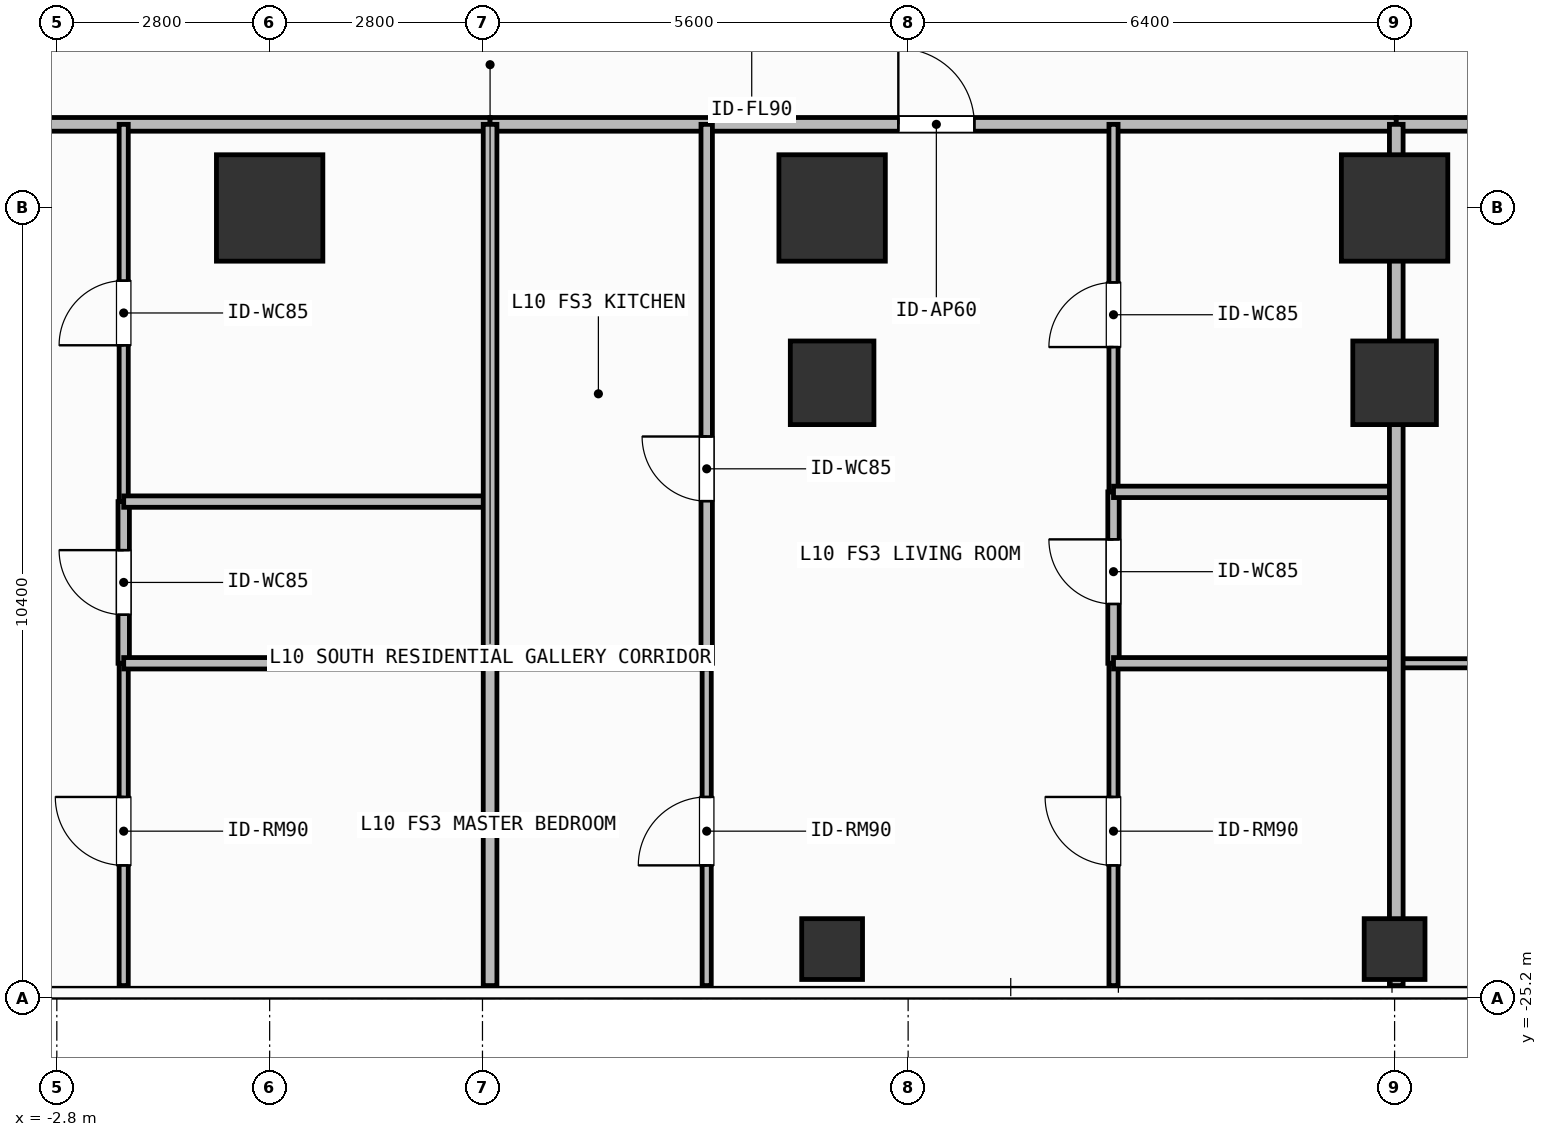
"""IFC4 building model, lengths in metres.
Left out: names, types, materials, properties, quantities, classifications, styles, units other than length and angle.
Written with IfcOpenShell. Run it as: python <this file> out.ifc"""

import sys

from ifc_helpers import new_model, si_unit, direction, frame, frame_2d, origin, origin_2d, place, context, subcontext, project, spatial, rectangle, hollow_rectangle, extrude, element, fill, save


model = new_model("IFC4")
c1 = context("Model", 3, precision=1e-05, world=origin(), true_north=direction((0.0, 1.0)))
c2 = subcontext(c1, "Body", "Model", "MODEL_VIEW")
j1 = project(units=[si_unit("LENGTHUNIT", "METRE"), si_unit("PLANEANGLEUNIT", "RADIAN")], contexts=[c1])
p1 = place(None, origin())
s1 = spatial("IfcSite", under=j1, at=p1, CompositionType="ELEMENT")
p2 = place(p1, origin())
s2 = spatial("IfcBuilding", under=s1, at=p2, CompositionType="ELEMENT")
p3 = place(p2, frame((0.0, 0.0, 38.4)))
s3 = spatial("IfcBuildingStorey", under=s2, at=p3, CompositionType="ELEMENT", Elevation=38.4)
for number, where, z_axis, x_axis in (
    (1, (0.0, -14.8, 0.0), (0.0, 0.0, 1.0), (1.0, 0.0, 0.0)),
    (2, (7.4, -14.8, 0.0), (0.0, 0.0, 1.0), (1.0, 0.0, 0.0)),
    (3, (14.8, -14.8, 0.0), (0.0, 0.0, 1.0), (1.0, 0.0, 0.0)),
):
    element("IfcColumn", number, at=place(p3, frame(where, z_axis=z_axis, x_axis=x_axis)), inside=s3, PredefinedType="COLUMN", context=c2, shape_type="SweptSolid", body=[
        extrude(rectangle(XDim=1.4, YDim=1.4, at=origin_2d()), origin(), (0.0, 0.0, 1.0), 3.9),
    ])
for number, where, z_axis, x_axis in (
    (4, (7.4, -17.1, 0.0), (0.0, 0.0, 1.0), (1.0, 0.0, 0.0)),
    (5, (14.8, -17.1, 0.0), (0.0, 0.0, 1.0), (1.0, 0.0, 0.0)),
):
    element("IfcColumn", number, at=place(p3, frame(where, z_axis=z_axis, x_axis=x_axis)), inside=s3, PredefinedType="COLUMN", context=c2, shape_type="SweptSolid", body=[
        extrude(rectangle(XDim=1.1, YDim=1.1, at=origin_2d()), origin(), (0.0, 0.0, 1.0), 3.9),
    ])
for number, where, z_axis, x_axis in (
    (6, (7.4, -24.55, 0.0), (0.0, 0.0, 1.0), (1.0, 0.0, 0.0)),
    (7, (14.8, -24.55, 0.0), (0.0, 0.0, 1.0), (1.0, 0.0, 0.0)),
):
    element("IfcColumn", number, at=place(p3, frame(where, z_axis=z_axis, x_axis=x_axis)), inside=s3, PredefinedType="COLUMN", context=c2, shape_type="SweptSolid", body=[
        extrude(hollow_rectangle(XDim=0.8, YDim=0.8, WallThickness=0.036, at=origin_2d()), origin(), (0.0, 0.0, 1.0), 3.9),
    ])
p4 = place(p3, frame((-9.151, -13.7, 0.0), z_axis=(0.0, 0.0, 1.0), x_axis=(1.0, 0.0, 0.0)))
e8 = element("IfcWall", 8, at=p4, inside=s3, PredefinedType="PARTITIONING", context=c2, shape_type="SweptSolid", body=[
    extrude(rectangle(XDim=12.051, YDim=0.18, at=frame_2d((6.025, 0.0))), origin(), (0.0, 0.0, 1.0), 3.68),
])
p5 = place(p4, frame((4.989, 0.0, 0.0)))
e9 = element("IfcOpeningElement", 9, at=p5, cuts=e8, PredefinedType="OPENING", context=c2, shape_type="SweptSolid", body=[
    extrude(rectangle(XDim=1.0, YDim=2.2, at=frame_2d((0.5, 1.1))), frame((0.0, 0.1, 0.0), z_axis=(0.0, -1.0, 0.0), x_axis=(1.0, 0.0, 0.0)), (0.0, 0.0, 1.0), 0.2),
])
p6 = place(p3, frame((-1.92, -20.79, 0.0), z_axis=(0.0, 0.0, 1.0), x_axis=(0.0, 1.0, 0.0)))
e10 = element("IfcWall", 10, at=p6, inside=s3, PredefinedType="PARTITIONING", context=c2, shape_type="SweptSolid", body=[
    extrude(rectangle(XDim=2.127, YDim=0.15, at=frame_2d((1.063, 0.0))), origin(), (0.0, 0.0, 1.0), 3.68),
])
p7 = place(p6, frame((0.638, 0.0, 0.0)))
e11 = element("IfcOpeningElement", 11, at=p7, cuts=e10, PredefinedType="OPENING", context=c2, shape_type="SweptSolid", body=[
    extrude(rectangle(XDim=0.85, YDim=2.1, at=frame_2d((0.425, 1.05))), frame((0.0, 0.085, 0.0), z_axis=(0.0, -1.0, 0.0), x_axis=(1.0, 0.0, 0.0)), (0.0, 0.0, 1.0), 0.17),
])
p8 = place(p3, frame((-1.92, -18.663, 0.0), z_axis=(0.0, 0.0, 1.0), x_axis=(0.0, 1.0, 0.0)))
e12 = element("IfcWall", 12, at=p8, inside=s3, PredefinedType="PARTITIONING", context=c2, shape_type="SweptSolid", body=[
    extrude(rectangle(XDim=4.963, YDim=0.12, at=frame_2d((2.481, 0.0))), origin(), (0.0, 0.0, 1.0), 3.68),
])
p9 = place(p8, frame((2.056, 0.0, 0.0)))
e13 = element("IfcOpeningElement", 13, at=p9, cuts=e12, PredefinedType="OPENING", context=c2, shape_type="SweptSolid", body=[
    extrude(rectangle(XDim=0.85, YDim=2.1, at=frame_2d((0.425, 1.05))), frame((0.0, 0.07, 0.0), z_axis=(0.0, -1.0, 0.0), x_axis=(1.0, 0.0, 0.0)), (0.0, 0.0, 1.0), 0.14),
])
p10 = place(p3, frame((-1.92, -25.03, 0.0), z_axis=(0.0, 0.0, 1.0), x_axis=(0.0, 1.0, 0.0)))
e14 = element("IfcWall", 14, at=p10, inside=s3, PredefinedType="PARTITIONING", context=c2, shape_type="SweptSolid", body=[
    extrude(rectangle(XDim=4.24, YDim=0.12, at=frame_2d((2.12, 0.0))), origin(), (0.0, 0.0, 1.0), 3.68),
])
p11 = place(p10, frame((1.581, 0.0, 0.0)))
e15 = element("IfcOpeningElement", 15, at=p11, cuts=e14, PredefinedType="OPENING", context=c2, shape_type="SweptSolid", body=[
    extrude(rectangle(XDim=0.9, YDim=2.1, at=frame_2d((0.45, 1.05))), frame((0.0, 0.07, 0.0), z_axis=(0.0, -1.0, 0.0), x_axis=(1.0, 0.0, 0.0)), (0.0, 0.0, 1.0), 0.14),
])
p12 = place(p3, frame((2.9, -13.7, 0.0), z_axis=(0.0, 0.0, 1.0), x_axis=(1.0, 0.0, 0.0)))
e16 = element("IfcWall", 16, at=p12, inside=s3, PredefinedType="PARTITIONING", context=c2, shape_type="SweptSolid", body=[
    extrude(rectangle(XDim=11.922, YDim=0.18, at=frame_2d((5.961, 0.0))), origin(), (0.0, 0.0, 1.0), 3.68),
])
p13 = place(p12, frame((5.371, 0.0, 0.0)))
e17 = element("IfcOpeningElement", 17, at=p13, cuts=e16, PredefinedType="OPENING", context=c2, shape_type="SweptSolid", body=[
    extrude(rectangle(XDim=1.0, YDim=2.2, at=frame_2d((0.5, 1.1))), frame((0.0, 0.1, 0.0), z_axis=(0.0, -1.0, 0.0), x_axis=(1.0, 0.0, 0.0)), (0.0, 0.0, 1.0), 0.2),
])
p14 = place(p3, frame((5.75, -20.79, 0.0), z_axis=(0.0, 0.0, 1.0), x_axis=(0.0, 1.0, 0.0)))
e18 = element("IfcWall", 18, at=p14, inside=s3, PredefinedType="PARTITIONING", context=c2, shape_type="SweptSolid", body=[
    extrude(rectangle(XDim=7.09, YDim=0.15, at=frame_2d((3.545, 0.0))), origin(), (0.0, 0.0, 1.0), 3.68),
])
p15 = place(p14, frame((2.133, 0.0, 0.0)))
e19 = element("IfcOpeningElement", 19, at=p15, cuts=e18, PredefinedType="OPENING", context=c2, shape_type="SweptSolid", body=[
    extrude(rectangle(XDim=0.85, YDim=2.1, at=frame_2d((0.425, 1.05))), frame((0.0, 0.085, 0.0), z_axis=(0.0, -1.0, 0.0), x_axis=(1.0, 0.0, 0.0)), (0.0, 0.0, 1.0), 0.17),
])
p16 = place(p3, frame((5.75, -25.03, 0.0), z_axis=(0.0, 0.0, 1.0), x_axis=(0.0, 1.0, 0.0)))
e20 = element("IfcWall", 20, at=p16, inside=s3, PredefinedType="PARTITIONING", context=c2, shape_type="SweptSolid", body=[
    extrude(rectangle(XDim=4.24, YDim=0.12, at=frame_2d((2.12, 0.0))), origin(), (0.0, 0.0, 1.0), 3.68),
])
p17 = place(p16, frame((1.581, 0.0, 0.0)))
e21 = element("IfcOpeningElement", 21, at=p17, cuts=e20, PredefinedType="OPENING", context=c2, shape_type="SweptSolid", body=[
    extrude(rectangle(XDim=0.9, YDim=2.1, at=frame_2d((0.45, 1.05))), frame((0.0, 0.07, 0.0), z_axis=(0.0, -1.0, 0.0), x_axis=(1.0, 0.0, 0.0)), (0.0, 0.0, 1.0), 0.14),
])
p18 = place(p3, frame((11.102, -20.79, 0.0), z_axis=(0.0, 0.0, 1.0), x_axis=(0.0, 1.0, 0.0)))
e22 = element("IfcWall", 22, at=p18, inside=s3, PredefinedType="PARTITIONING", context=c2, shape_type="SweptSolid", body=[
    extrude(rectangle(XDim=2.255, YDim=0.15, at=frame_2d((1.127, 0.0))), origin(), (0.0, 0.0, 1.0), 3.37),
])
p19 = place(p18, frame((0.78, 0.0, 0.0)))
e23 = element("IfcOpeningElement", 23, at=p19, cuts=e22, PredefinedType="OPENING", context=c2, shape_type="SweptSolid", body=[
    extrude(rectangle(XDim=0.85, YDim=2.1, at=frame_2d((0.425, 1.05))), frame((0.0, 0.085, 0.0), z_axis=(0.0, -1.0, 0.0), x_axis=(1.0, 0.0, 0.0)), (0.0, 0.0, 1.0), 0.17),
])
p20 = place(p3, frame((11.102, -18.535, 0.0), z_axis=(0.0, 0.0, 1.0), x_axis=(0.0, 1.0, 0.0)))
e24 = element("IfcWall", 24, at=p20, inside=s3, PredefinedType="PARTITIONING", context=c2, shape_type="SweptSolid", body=[
    extrude(rectangle(XDim=4.835, YDim=0.12, at=frame_2d((2.417, 0.0))), origin(), (0.0, 0.0, 1.0), 3.37),
])
p21 = place(p20, frame((1.905, 0.0, 0.0)))
e25 = element("IfcOpeningElement", 25, at=p21, cuts=e24, PredefinedType="OPENING", context=c2, shape_type="SweptSolid", body=[
    extrude(rectangle(XDim=0.85, YDim=2.1, at=frame_2d((0.425, 1.05))), frame((0.0, 0.07, 0.0), z_axis=(0.0, -1.0, 0.0), x_axis=(1.0, 0.0, 0.0)), (0.0, 0.0, 1.0), 0.14),
])
p22 = place(p3, frame((11.102, -25.03, 0.0), z_axis=(0.0, 0.0, 1.0), x_axis=(0.0, 1.0, 0.0)))
e26 = element("IfcWall", 26, at=p22, inside=s3, PredefinedType="PARTITIONING", context=c2, shape_type="SweptSolid", body=[
    extrude(rectangle(XDim=4.24, YDim=0.12, at=frame_2d((2.12, 0.0))), origin(), (0.0, 0.0, 1.0), 3.37),
])
p23 = place(p22, frame((1.581, 0.0, 0.0)))
e27 = element("IfcOpeningElement", 27, at=p23, cuts=e26, PredefinedType="OPENING", context=c2, shape_type="SweptSolid", body=[
    extrude(rectangle(XDim=0.9, YDim=2.1, at=frame_2d((0.45, 1.05))), frame((0.0, 0.07, 0.0), z_axis=(0.0, -1.0, 0.0), x_axis=(1.0, 0.0, 0.0)), (0.0, 0.0, 1.0), 0.14),
])
p24 = place(p3, frame((14.822, -13.7, 0.0), z_axis=(0.0, 0.0, 1.0), x_axis=(1.0, 0.0, 0.0)))
e28 = element("IfcWall", 28, at=p24, inside=s3, PredefinedType="PARTITIONING", context=c2, shape_type="SweptSolid", body=[
    extrude(rectangle(XDim=9.598, YDim=0.18, at=frame_2d((4.799, 0.0))), origin(), (0.0, 0.0, 1.0), 3.68),
])
p25 = place(p24, frame((2.859, 0.0, 0.0)))
e29 = element("IfcOpeningElement", 29, at=p25, cuts=e28, PredefinedType="OPENING", context=c2, shape_type="SweptSolid", body=[
    extrude(rectangle(XDim=1.0, YDim=2.2, at=frame_2d((0.5, 1.1))), frame((0.0, 0.1, 0.0), z_axis=(0.0, -1.0, 0.0), x_axis=(1.0, 0.0, 0.0)), (0.0, 0.0, 1.0), 0.2),
])
p26 = place(p3, frame((14.822, -20.79, 0.0), z_axis=(0.0, 0.0, 1.0), x_axis=(1.0, 0.0, 0.0)))
e30 = element("IfcWall", 30, at=p26, inside=s3, PredefinedType="PARTITIONING", context=c2, shape_type="SweptSolid", body=[
    extrude(rectangle(XDim=6.533, YDim=0.12, at=frame_2d((3.267, 0.0))), origin(), (0.0, 0.0, 1.0), 3.68),
])
p27 = place(p26, frame((2.816, 0.0, 0.0)))
e31 = element("IfcOpeningElement", 31, at=p27, cuts=e30, PredefinedType="OPENING", context=c2, shape_type="SweptSolid", body=[
    extrude(rectangle(XDim=0.9, YDim=2.1, at=frame_2d((0.45, 1.05))), frame((0.0, 0.07, 0.0), z_axis=(0.0, -1.0, 0.0), x_axis=(1.0, 0.0, 0.0)), (0.0, 0.0, 1.0), 0.14),
])
for number, where, z_axis, x_axis in (
    (32, (-1.92, -18.663, 0.0), (0.0, 0.0, 1.0), (1.0, 0.0, 0.0)),
    (33, (-1.92, -20.79, 0.0), (0.0, 0.0, 1.0), (1.0, 0.0, 0.0)),
):
    element("IfcWall", number, at=place(p3, frame(where, z_axis=z_axis, x_axis=x_axis)), inside=s3, PredefinedType="PARTITIONING", context=c2, shape_type="SweptSolid", body=[
        extrude(rectangle(XDim=4.82, YDim=0.15, at=frame_2d((2.41, 0.0))), origin(), (0.0, 0.0, 1.0), 3.68),
    ])
p28 = place(p3, frame((2.9, -20.79, 0.0), z_axis=(0.0, 0.0, 1.0), x_axis=(1.0, 0.0, 0.0)))
e34 = element("IfcWall", 34, at=p28, inside=s3, PredefinedType="PARTITIONING", context=c2, shape_type="SweptSolid", body=[
    extrude(rectangle(XDim=2.85, YDim=0.15, at=frame_2d((1.425, 0.0))), origin(), (0.0, 0.0, 1.0), 3.68),
])
for number, where, z_axis, x_axis in (
    (35, (11.102, -18.535, 0.0), (0.0, 0.0, 1.0), (1.0, 0.0, 0.0)),
    (36, (11.102, -20.79, 0.0), (0.0, 0.0, 1.0), (1.0, 0.0, 0.0)),
):
    element("IfcWall", number, at=place(p3, frame(where, z_axis=z_axis, x_axis=x_axis)), inside=s3, PredefinedType="PARTITIONING", context=c2, shape_type="SweptSolid", body=[
        extrude(rectangle(XDim=3.72, YDim=0.15, at=frame_2d((1.86, 0.0))), origin(), (0.0, 0.0, 1.0), 3.68),
    ])
p29 = place(p3, frame((2.9, -25.03, 0.0), z_axis=(0.0, 0.0, 1.0), x_axis=(0.0, 1.0, 0.0)))
e37 = element("IfcWall", 37, at=p29, inside=s3, PredefinedType="PARTITIONING", context=c2, shape_type="SweptSolid", body=[
    extrude(rectangle(XDim=11.33, YDim=0.18, at=frame_2d((5.665, 0.0))), origin(), (0.0, 0.0, 1.0), 3.68),
])
p30 = place(p3, frame((14.822, -25.03, 0.0), z_axis=(0.0, 0.0, 1.0), x_axis=(0.0, 1.0, 0.0)))
e38 = element("IfcWall", 38, at=p30, inside=s3, PredefinedType="PARTITIONING", context=c2, shape_type="SweptSolid", body=[
    extrude(rectangle(XDim=11.33, YDim=0.18, at=frame_2d((5.665, 0.0))), origin(), (0.0, 0.0, 1.0), 3.082),
])
p31 = place(p7, origin())
e39 = element("IfcDoor", 39, at=p31, inside=s3, OperationType="SINGLE_SWING_RIGHT", PredefinedType="DOOR", context=c2, shape_type="SweptSolid", body=[
    extrude(rectangle(XDim=0.85, YDim=2.1, at=frame_2d((0.425, 1.05))), frame((0.0, 0.025, 0.0), z_axis=(0.0, -1.0, 0.0), x_axis=(1.0, 0.0, 0.0)), (0.0, 0.0, 1.0), 0.05),
])
fill(e11, e39)
p32 = place(p9, origin())
e40 = element("IfcDoor", 40, at=p32, inside=s3, OperationType="SINGLE_SWING_LEFT", PredefinedType="DOOR", context=c2, shape_type="SweptSolid", body=[
    extrude(rectangle(XDim=0.85, YDim=2.1, at=frame_2d((0.425, 1.05))), frame((0.0, 0.025, 0.0), z_axis=(0.0, -1.0, 0.0), x_axis=(1.0, 0.0, 0.0)), (0.0, 0.0, 1.0), 0.05),
])
fill(e13, e40)
p33 = place(p11, origin())
e41 = element("IfcDoor", 41, at=p33, inside=s3, OperationType="SINGLE_SWING_RIGHT", PredefinedType="DOOR", context=c2, shape_type="SweptSolid", body=[
    extrude(rectangle(XDim=0.9, YDim=2.1, at=frame_2d((0.45, 1.05))), frame((0.0, 0.025, 0.0), z_axis=(0.0, -1.0, 0.0), x_axis=(1.0, 0.0, 0.0)), (0.0, 0.0, 1.0), 0.05),
])
fill(e15, e41)
p34 = place(p13, origin())
e42 = element("IfcDoor", 42, at=p34, inside=s3, OperationType="SINGLE_SWING_LEFT", PredefinedType="DOOR", context=c2, shape_type="SweptSolid", body=[
    extrude(rectangle(XDim=1.0, YDim=2.2, at=frame_2d((0.5, 1.1))), frame((0.0, 0.025, 0.0), z_axis=(0.0, -1.0, 0.0), x_axis=(1.0, 0.0, 0.0)), (0.0, 0.0, 1.0), 0.05),
])
fill(e17, e42)
p35 = place(p15, origin())
e43 = element("IfcDoor", 43, at=p35, inside=s3, OperationType="SINGLE_SWING_RIGHT", PredefinedType="DOOR", context=c2, shape_type="SweptSolid", body=[
    extrude(rectangle(XDim=0.85, YDim=2.1, at=frame_2d((0.425, 1.05))), frame((0.0, 0.025, 0.0), z_axis=(0.0, -1.0, 0.0), x_axis=(1.0, 0.0, 0.0)), (0.0, 0.0, 1.0), 0.05),
])
fill(e19, e43)
p36 = place(p17, origin())
e44 = element("IfcDoor", 44, at=p36, inside=s3, OperationType="SINGLE_SWING_LEFT", PredefinedType="DOOR", context=c2, shape_type="SweptSolid", body=[
    extrude(rectangle(XDim=0.9, YDim=2.1, at=frame_2d((0.45, 1.05))), frame((0.0, 0.025, 0.0), z_axis=(0.0, -1.0, 0.0), x_axis=(1.0, 0.0, 0.0)), (0.0, 0.0, 1.0), 0.05),
])
fill(e21, e44)
p37 = place(p19, origin())
e45 = element("IfcDoor", 45, at=p37, inside=s3, OperationType="SINGLE_SWING_RIGHT", PredefinedType="DOOR", context=c2, shape_type="SweptSolid", body=[
    extrude(rectangle(XDim=0.85, YDim=2.1, at=frame_2d((0.425, 1.05))), frame((0.0, 0.025, 0.0), z_axis=(0.0, -1.0, 0.0), x_axis=(1.0, 0.0, 0.0)), (0.0, 0.0, 1.0), 0.05),
])
fill(e23, e45)
p38 = place(p21, origin())
e46 = element("IfcDoor", 46, at=p38, inside=s3, OperationType="SINGLE_SWING_LEFT", PredefinedType="DOOR", context=c2, shape_type="SweptSolid", body=[
    extrude(rectangle(XDim=0.85, YDim=2.1, at=frame_2d((0.425, 1.05))), frame((0.0, 0.025, 0.0), z_axis=(0.0, -1.0, 0.0), x_axis=(1.0, 0.0, 0.0)), (0.0, 0.0, 1.0), 0.05),
])
fill(e25, e46)
p39 = place(p23, origin())
e47 = element("IfcDoor", 47, at=p39, inside=s3, OperationType="SINGLE_SWING_RIGHT", PredefinedType="DOOR", context=c2, shape_type="SweptSolid", body=[
    extrude(rectangle(XDim=0.9, YDim=2.1, at=frame_2d((0.45, 1.05))), frame((0.0, 0.025, 0.0), z_axis=(0.0, -1.0, 0.0), x_axis=(1.0, 0.0, 0.0)), (0.0, 0.0, 1.0), 0.05),
])
fill(e27, e47)
save(model, sys.argv[1])
